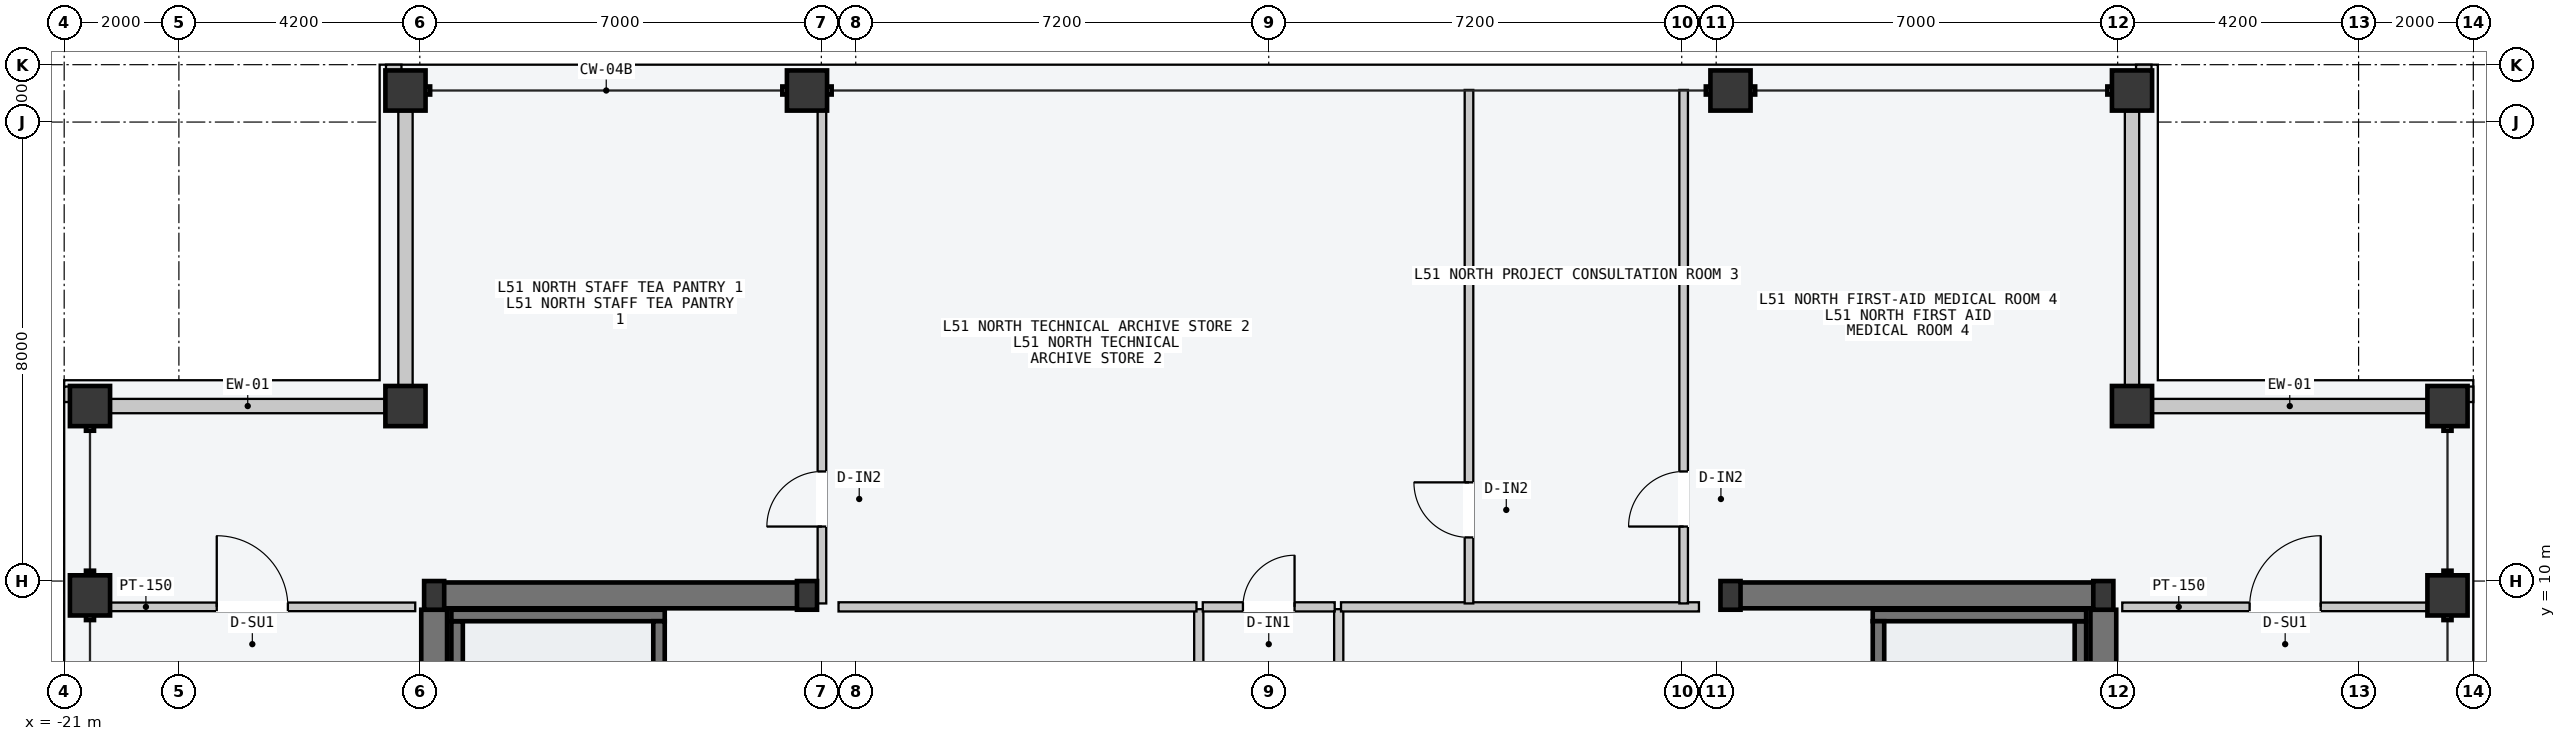
"""IFC4 building model, lengths in metres.
Left out: names, types, materials, properties, quantities, classifications, styles, units other than length and angle.
Written with IfcOpenShell. Run it as: python <this file> out.ifc"""

import sys

from ifc_helpers import new_model, si_unit, direction, frame, frame_2d, origin, origin_2d, place, context, subcontext, project, spatial, rectangle, hollow_rectangle, i_section, extrude, element, fill, save


model = new_model("IFC4")
c1 = context("Model", 3, precision=1e-05, world=origin(), true_north=direction((0.0, 1.0)))
c2 = subcontext(c1, "Body", "Model", "MODEL_VIEW")
j1 = project(units=[si_unit("LENGTHUNIT", "METRE"), si_unit("PLANEANGLEUNIT", "RADIAN")], contexts=[c1])
p1 = place(None, origin())
s1 = spatial("IfcSite", under=j1, at=p1, CompositionType="ELEMENT")
p2 = place(p1, origin())
s2 = spatial("IfcBuilding", under=s1, at=p2, CompositionType="ELEMENT")
p3 = place(p2, frame((0.0, 0.0, 194.7)))
s3 = spatial("IfcBuildingStorey", under=s2, at=p3, CompositionType="ELEMENT", Elevation=194.7)
p4 = place(p3, frame((-14.53, 9.75, -0.2), z_axis=(0.0, 0.0, 1.0), x_axis=(1.0, 0.0, 0.0)))
e1 = element("IfcWall", 1, at=p4, inside=s3, PredefinedType="SHEAR", context=c2, shape_type="SweptSolid", body=[
    extrude(rectangle(XDim=6.46, YDim=0.45, at=frame_2d((3.23, 0.0))), origin(), (0.0, 0.0, 1.0), 3.6),
])
p5 = place(p3, frame((-14.55, 0.25, -0.2), z_axis=(0.0, 0.0, 1.0), x_axis=(0.0, 1.0, 0.0)))
e2 = element("IfcWall", 2, at=p5, inside=s3, PredefinedType="SHEAR", context=c2, shape_type="SweptSolid", body=[
    extrude(rectangle(XDim=9.25, YDim=0.45, at=frame_2d((4.625, 0.0))), origin(), (0.0, 0.0, 1.0), 3.6),
])
p6 = place(p3, frame((8.07, 9.75, -0.2), z_axis=(0.0, 0.0, 1.0), x_axis=(1.0, 0.0, 0.0)))
e3 = element("IfcWall", 3, at=p6, inside=s3, PredefinedType="SHEAR", context=c2, shape_type="SweptSolid", body=[
    extrude(rectangle(XDim=6.46, YDim=0.45, at=frame_2d((3.23, 0.0))), origin(), (0.0, 0.0, 1.0), 3.6),
])
p7 = place(p3, frame((14.55, 0.25, -0.2), z_axis=(0.0, 0.0, 1.0), x_axis=(0.0, 1.0, 0.0)))
e4 = element("IfcWall", 4, at=p7, inside=s3, PredefinedType="SHEAR", context=c2, shape_type="SweptSolid", body=[
    extrude(rectangle(XDim=9.25, YDim=0.45, at=frame_2d((4.625, 0.0))), origin(), (0.0, 0.0, 1.0), 3.6),
])
for number, where, z_axis, x_axis in (
    (5, (-14.15, 1.5, -0.2), (0.0, 0.0, 1.0), (0.0, 1.0, 0.0)),
    (6, (14.15, 1.5, -0.2), (0.0, 0.0, 1.0), (0.0, 1.0, 0.0)),
):
    element("IfcWall", number, at=place(p3, frame(where, z_axis=z_axis, x_axis=x_axis)), inside=s3, PredefinedType="SOLIDWALL", context=c2, shape_type="SweptSolid", body=[
        extrude(rectangle(XDim=7.8, YDim=0.2, at=frame_2d((3.9, 0.0))), origin(), (0.0, 0.0, 1.0), 3.6),
    ])
p8 = place(p3, frame((-14.25, 9.4, -0.2), z_axis=(0.0, 0.0, 1.0), x_axis=(1.0, 0.0, 0.0)))
e7 = element("IfcWall", 7, at=p8, inside=s3, PredefinedType="SOLIDWALL", context=c2, shape_type="SweptSolid", body=[
    extrude(rectangle(XDim=3.72, YDim=0.2, at=frame_2d((1.86, 0.0))), origin(), (0.0, 0.0, 1.0), 3.6),
])
p9 = place(p3, frame((-10.63, 1.5, -0.2), z_axis=(0.0, 0.0, 1.0), x_axis=(0.0, 1.0, 0.0)))
e8 = element("IfcWall", 8, at=p9, inside=s3, PredefinedType="SOLIDWALL", context=c2, shape_type="SweptSolid", body=[
    extrude(rectangle(XDim=7.8, YDim=0.2, at=frame_2d((3.9, 0.0))), origin(), (0.0, 0.0, 1.0), 3.6),
])
p10 = place(p3, frame((10.53, 9.4, -0.2), z_axis=(0.0, 0.0, 1.0), x_axis=(1.0, 0.0, 0.0)))
e9 = element("IfcWall", 9, at=p10, inside=s3, PredefinedType="SOLIDWALL", context=c2, shape_type="SweptSolid", body=[
    extrude(rectangle(XDim=3.72, YDim=0.2, at=frame_2d((1.86, 0.0))), origin(), (0.0, 0.0, 1.0), 3.6),
])
p11 = place(p3, frame((10.63, 1.5, -0.2), z_axis=(0.0, 0.0, 1.0), x_axis=(0.0, 1.0, 0.0)))
e10 = element("IfcWall", 10, at=p11, inside=s3, PredefinedType="SOLIDWALL", context=c2, shape_type="SweptSolid", body=[
    extrude(rectangle(XDim=7.8, YDim=0.2, at=frame_2d((3.9, 0.0))), origin(), (0.0, 0.0, 1.0), 3.6),
])
for number, where, z_axis, x_axis in (
    (11, (-14.55, 9.75, 0.0), (0.0, 0.0, 1.0), (1.0, 0.0, 0.0)),
    (12, (-8.05, 9.75, 0.0), (0.0, 0.0, 1.0), (1.0, 0.0, 0.0)),
    (13, (8.05, 9.75, 0.0), (0.0, 0.0, 1.0), (1.0, 0.0, 0.0)),
    (14, (14.55, 9.75, 0.0), (0.0, 0.0, 1.0), (1.0, 0.0, 0.0)),
):
    element("IfcColumn", number, at=place(p3, frame(where, z_axis=z_axis, x_axis=x_axis)), inside=s3, PredefinedType="COLUMN", context=c2, shape_type="SweptSolid", body=[
        extrude(i_section(OverallWidth=0.35, OverallDepth=0.5, WebThickness=0.02, FlangeThickness=0.032, at=origin_2d()), origin(), (0.0, 0.0, 1.0), 3.6),
    ])
for number, where, z_axis, x_axis in (
    (15, (-15.05, 18.55, 0.0), (0.0, 0.0, 1.0), (1.0, 0.0, 0.0)),
    (16, (-8.05, 18.55, 0.0), (0.0, 0.0, 1.0), (1.0, 0.0, 0.0)),
    (17, (8.05, 18.55, 0.0), (0.0, 0.0, 1.0), (1.0, 0.0, 0.0)),
    (18, (15.05, 18.55, 0.0), (0.0, 0.0, 1.0), (1.0, 0.0, 0.0)),
    (19, (-20.55, 9.75, 0.0), (0.0, 0.0, 1.0), (0.0, 1.0, 0.0)),
    (20, (-20.55, 13.05, 0.0), (0.0, 0.0, 1.0), (0.0, 1.0, 0.0)),
    (21, (20.55, 9.75, 0.0), (0.0, 0.0, 1.0), (0.0, 1.0, 0.0)),
    (22, (20.55, 13.05, 0.0), (0.0, 0.0, 1.0), (0.0, 1.0, 0.0)),
    (23, (-15.05, 13.05, 0.0), (0.0, 0.0, 1.0), (1.0, 0.0, 0.0)),
    (24, (15.05, 13.05, 0.0), (0.0, 0.0, 1.0), (1.0, 0.0, 0.0)),
):
    element("IfcColumn", number, at=place(p3, frame(where, z_axis=z_axis, x_axis=x_axis)), inside=s3, PredefinedType="COLUMN", context=c2, shape_type="SweptSolid", body=[
        extrude(hollow_rectangle(XDim=0.7, YDim=0.7, WallThickness=0.03, at=origin_2d()), origin(), (0.0, 0.0, 1.0), 3.6),
    ])
for number, where, z_axis, x_axis in (
    (25, (-20.19, 13.05, 0.0), (0.0, 0.0, 1.0), (1.0, 0.0, 0.0)),
    (26, (-15.05, 13.41, 0.0), (0.0, 0.0, 1.0), (0.0, 1.0, 0.0)),
    (27, (15.41, 13.05, 0.0), (0.0, 0.0, 1.0), (1.0, 0.0, 0.0)),
    (28, (15.05, 13.41, 0.0), (0.0, 0.0, 1.0), (0.0, 1.0, 0.0)),
):
    element("IfcWall", number, at=place(p3, frame(where, z_axis=z_axis, x_axis=x_axis)), inside=s3, PredefinedType="STANDARD", context=c2, shape_type="SweptSolid", body=[
        extrude(rectangle(XDim=4.78, YDim=0.25, at=frame_2d((2.39, 0.0))), origin(), (0.0, 0.0, 1.0), 2.75),
    ])
for number, where, z_axis, x_axis in (
    (29, (-15.39, 18.89, 0.0), (0.0, 0.0, 1.0), (1.0, 0.0, 0.0)),
    (30, (-20.89, 13.12, 0.0), (0.0, 0.0, 1.0), (0.0, 1.0, 0.0)),
    (31, (15.12, 18.89, 0.0), (0.0, 0.0, 1.0), (1.0, 0.0, 0.0)),
    (32, (20.89, 13.12, 0.0), (0.0, 0.0, 1.0), (0.0, 1.0, 0.0)),
):
    element("IfcWall", number, at=place(p3, frame(where, z_axis=z_axis, x_axis=x_axis)), inside=s3, PredefinedType="PARAPET", context=c2, shape_type="SweptSolid", body=[
        extrude(rectangle(XDim=0.27, YDim=0.22, at=frame_2d((0.135, 0.0))), origin(), (0.0, 0.0, 1.0), 1.2),
    ])
p12 = place(p3, frame((-1.22, -3.5, 0.0), z_axis=(0.0, 0.0, 1.0), x_axis=(0.0, 1.0, 0.0)))
e33 = element("IfcWall", 33, at=p12, inside=s3, PredefinedType="PARTITIONING", context=c2, shape_type="SweptSolid", body=[
    extrude(rectangle(XDim=13.01, YDim=0.16, at=frame_2d((6.505, 0.0))), origin(), (0.0, 0.0, 1.0), 3.4),
])
p13 = place(p12, frame((6.1, 0.0, 0.0)))
e34 = element("IfcOpeningElement", 34, at=p13, cuts=e33, PredefinedType="OPENING", context=c2, shape_type="SweptSolid", body=[
    extrude(rectangle(XDim=1.24, YDim=2.24, at=frame_2d((0.62, 1.12))), frame((0.0, 0.09, 0.0), z_axis=(0.0, -1.0, 0.0), x_axis=(1.0, 0.0, 0.0)), (0.0, 0.0, 1.0), 0.18),
])
p14 = place(p12, frame((1.6, 0.0, 0.0)))
e35 = element("IfcOpeningElement", 35, at=p14, cuts=e33, PredefinedType="OPENING", context=c2, shape_type="SweptSolid", body=[
    extrude(rectangle(XDim=0.96, YDim=2.18, at=frame_2d((0.48, 1.09))), frame((0.0, 0.09, 0.0), z_axis=(0.0, -1.0, 0.0), x_axis=(1.0, 0.0, 0.0)), (0.0, 0.0, 1.0), 0.18),
])
p15 = place(p3, frame((-7.5, 9.55, 0.0), z_axis=(0.0, 0.0, 1.0), x_axis=(1.0, 0.0, 0.0)))
e36 = element("IfcWall", 36, at=p15, inside=s3, PredefinedType="PARTITIONING", context=c2, shape_type="SweptSolid", body=[
    extrude(rectangle(XDim=6.24, YDim=0.16, at=frame_2d((3.12, 0.0))), origin(), (0.0, 0.0, 1.0), 3.4),
])
p16 = place(p3, frame((1.22, -3.5, 0.0), z_axis=(0.0, 0.0, 1.0), x_axis=(0.0, 1.0, 0.0)))
e37 = element("IfcWall", 37, at=p16, inside=s3, PredefinedType="PARTITIONING", context=c2, shape_type="SweptSolid", body=[
    extrude(rectangle(XDim=13.01, YDim=0.16, at=frame_2d((6.505, 0.0))), origin(), (0.0, 0.0, 1.0), 3.4),
])
p17 = place(p16, frame((6.1, 0.0, 0.0)))
e38 = element("IfcOpeningElement", 38, at=p17, cuts=e37, PredefinedType="OPENING", context=c2, shape_type="SweptSolid", body=[
    extrude(rectangle(XDim=1.24, YDim=2.24, at=frame_2d((0.62, 1.12))), frame((0.0, 0.09, 0.0), z_axis=(0.0, -1.0, 0.0), x_axis=(1.0, 0.0, 0.0)), (0.0, 0.0, 1.0), 0.18),
])
p18 = place(p16, frame((1.6, 0.0, 0.0)))
e39 = element("IfcOpeningElement", 39, at=p18, cuts=e37, PredefinedType="OPENING", context=c2, shape_type="SweptSolid", body=[
    extrude(rectangle(XDim=0.96, YDim=2.18, at=frame_2d((0.48, 1.09))), frame((0.0, 0.09, 0.0), z_axis=(0.0, -1.0, 0.0), x_axis=(1.0, 0.0, 0.0)), (0.0, 0.0, 1.0), 0.18),
])
p19 = place(p3, frame((1.26, 9.55, 0.0), z_axis=(0.0, 0.0, 1.0), x_axis=(1.0, 0.0, 0.0)))
e40 = element("IfcWall", 40, at=p19, inside=s3, PredefinedType="PARTITIONING", context=c2, shape_type="SweptSolid", body=[
    extrude(rectangle(XDim=6.24, YDim=0.16, at=frame_2d((3.12, 0.0))), origin(), (0.0, 0.0, 1.0), 3.4),
])
p20 = place(p3, frame((-7.79, 9.61, 0.0), z_axis=(0.0, 0.0, 1.0), x_axis=(0.0, 1.0, 0.0)))
e41 = element("IfcWall", 41, at=p20, inside=s3, PredefinedType="PARTITIONING", context=c2, shape_type="SweptSolid", body=[
    extrude(rectangle(XDim=8.95, YDim=0.15, at=frame_2d((4.475, 0.0))), origin(), (0.0, 0.0, 1.0), 3.4),
])
p21 = place(p20, frame((1.34, 0.0, 0.0)))
e42 = element("IfcOpeningElement", 42, at=p21, cuts=e41, PredefinedType="OPENING", context=c2, shape_type="SweptSolid", body=[
    extrude(rectangle(XDim=0.96, YDim=2.18, at=frame_2d((0.48, 1.09))), frame((0.0, 0.085, 0.0), z_axis=(0.0, -1.0, 0.0), x_axis=(1.0, 0.0, 0.0)), (0.0, 0.0, 1.0), 0.17),
])
p22 = place(p3, frame((3.491, 9.61, 0.0), z_axis=(0.0, 0.0, 1.0), x_axis=(0.0, 1.0, 0.0)))
e43 = element("IfcWall", 43, at=p22, inside=s3, PredefinedType="PARTITIONING", context=c2, shape_type="SweptSolid", body=[
    extrude(rectangle(XDim=8.95, YDim=0.15, at=frame_2d((4.475, 0.0))), origin(), (0.0, 0.0, 1.0), 3.4),
])
p23 = place(p22, frame((1.15, 0.0, 0.0)))
e44 = element("IfcOpeningElement", 44, at=p23, cuts=e43, PredefinedType="OPENING", context=c2, shape_type="SweptSolid", body=[
    extrude(rectangle(XDim=0.96, YDim=2.18, at=frame_2d((0.48, 1.09))), frame((0.0, 0.085, 0.0), z_axis=(0.0, -1.0, 0.0), x_axis=(1.0, 0.0, 0.0)), (0.0, 0.0, 1.0), 0.17),
])
p24 = place(p3, frame((7.233, 9.61, 0.0), z_axis=(0.0, 0.0, 1.0), x_axis=(0.0, 1.0, 0.0)))
e45 = element("IfcWall", 45, at=p24, inside=s3, PredefinedType="PARTITIONING", context=c2, shape_type="SweptSolid", body=[
    extrude(rectangle(XDim=8.95, YDim=0.15, at=frame_2d((4.475, 0.0))), origin(), (0.0, 0.0, 1.0), 3.4),
])
p25 = place(p24, frame((1.34, 0.0, 0.0)))
e46 = element("IfcOpeningElement", 46, at=p25, cuts=e45, PredefinedType="OPENING", context=c2, shape_type="SweptSolid", body=[
    extrude(rectangle(XDim=0.96, YDim=2.18, at=frame_2d((0.48, 1.09))), frame((0.0, 0.085, 0.0), z_axis=(0.0, -1.0, 0.0), x_axis=(1.0, 0.0, 0.0)), (0.0, 0.0, 1.0), 0.17),
])
p26 = place(p3, frame((-1.15, 9.55, 0.0), z_axis=(0.0, 0.0, 1.0), x_axis=(1.0, 0.0, 0.0)))
e47 = element("IfcWall", 47, at=p26, inside=s3, PredefinedType="PARTITIONING", context=c2, shape_type="SweptSolid", body=[
    extrude(rectangle(XDim=2.3, YDim=0.16, at=frame_2d((1.15, 0.0))), origin(), (0.0, 0.0, 1.0), 3.4),
])
p27 = place(p26, frame((0.7, 0.0, 0.0)))
e48 = element("IfcOpeningElement", 48, at=p27, cuts=e47, PredefinedType="OPENING", context=c2, shape_type="SweptSolid", body=[
    extrude(rectangle(XDim=0.9, YDim=2.15, at=frame_2d((0.45, 1.075))), frame((0.0, 0.09, 0.0), z_axis=(0.0, -1.0, 0.0), x_axis=(1.0, 0.0, 0.0)), (0.0, 0.0, 1.0), 0.18),
])
p28 = place(p3, frame((-20.56, 9.55, 0.0), z_axis=(0.0, 0.0, 1.0), x_axis=(1.0, 0.0, 0.0)))
e49 = element("IfcWall", 49, at=p28, inside=s3, PredefinedType="PARTITIONING", context=c2, shape_type="SweptSolid", body=[
    extrude(rectangle(XDim=5.68, YDim=0.15, at=frame_2d((2.84, 0.0))), origin(), (0.0, 0.0, 1.0), 3.4),
])
p29 = place(p28, frame((2.22, 0.0, 0.0)))
e50 = element("IfcOpeningElement", 50, at=p29, cuts=e49, PredefinedType="OPENING", context=c2, shape_type="SweptSolid", body=[
    extrude(rectangle(XDim=1.24, YDim=2.24, at=frame_2d((0.62, 1.12))), frame((0.0, 0.085, 0.0), z_axis=(0.0, -1.0, 0.0), x_axis=(1.0, 0.0, 0.0)), (0.0, 0.0, 1.0), 0.17),
])
p30 = place(p3, frame((14.88, 9.55, 0.0), z_axis=(0.0, 0.0, 1.0), x_axis=(1.0, 0.0, 0.0)))
e51 = element("IfcWall", 51, at=p30, inside=s3, PredefinedType="PARTITIONING", context=c2, shape_type="SweptSolid", body=[
    extrude(rectangle(XDim=5.68, YDim=0.15, at=frame_2d((2.84, 0.0))), origin(), (0.0, 0.0, 1.0), 3.4),
])
p31 = place(p30, frame((2.22, 0.0, 0.0)))
e52 = element("IfcOpeningElement", 52, at=p31, cuts=e51, PredefinedType="OPENING", context=c2, shape_type="SweptSolid", body=[
    extrude(rectangle(XDim=1.24, YDim=2.24, at=frame_2d((0.62, 1.12))), frame((0.0, 0.085, 0.0), z_axis=(0.0, -1.0, 0.0), x_axis=(1.0, 0.0, 0.0)), (0.0, 0.0, 1.0), 0.17),
])
p32 = place(p21, origin())
e53 = element("IfcDoor", 53, at=p32, inside=s3, OperationType="SINGLE_SWING_LEFT", PredefinedType="DOOR", context=c2, shape_type="SweptSolid", body=[
    extrude(rectangle(XDim=0.96, YDim=2.18, at=frame_2d((0.48, 1.09))), frame((0.0, 0.025, 0.0), z_axis=(0.0, -1.0, 0.0), x_axis=(1.0, 0.0, 0.0)), (0.0, 0.0, 1.0), 0.05),
])
fill(e42, e53)
p33 = place(p23, origin())
e54 = element("IfcDoor", 54, at=p33, inside=s3, OperationType="SINGLE_SWING_RIGHT", PredefinedType="DOOR", context=c2, shape_type="SweptSolid", body=[
    extrude(rectangle(XDim=0.96, YDim=2.18, at=frame_2d((0.48, 1.09))), frame((0.0, 0.025, 0.0), z_axis=(0.0, -1.0, 0.0), x_axis=(1.0, 0.0, 0.0)), (0.0, 0.0, 1.0), 0.05),
])
fill(e44, e54)
p34 = place(p25, origin())
e55 = element("IfcDoor", 55, at=p34, inside=s3, OperationType="SINGLE_SWING_LEFT", PredefinedType="DOOR", context=c2, shape_type="SweptSolid", body=[
    extrude(rectangle(XDim=0.96, YDim=2.18, at=frame_2d((0.48, 1.09))), frame((0.0, 0.025, 0.0), z_axis=(0.0, -1.0, 0.0), x_axis=(1.0, 0.0, 0.0)), (0.0, 0.0, 1.0), 0.05),
])
fill(e46, e55)
p35 = place(p27, origin())
e56 = element("IfcDoor", 56, at=p35, inside=s3, OperationType="SINGLE_SWING_RIGHT", PredefinedType="DOOR", context=c2, shape_type="SweptSolid", body=[
    extrude(rectangle(XDim=0.9, YDim=2.15, at=frame_2d((0.45, 1.075))), frame((0.0, 0.025, 0.0), z_axis=(0.0, -1.0, 0.0), x_axis=(1.0, 0.0, 0.0)), (0.0, 0.0, 1.0), 0.05),
])
fill(e48, e56)
p36 = place(p29, origin())
e57 = element("IfcDoor", 57, at=p36, inside=s3, OperationType="SINGLE_SWING_LEFT", PredefinedType="DOOR", context=c2, shape_type="SweptSolid", body=[
    extrude(rectangle(XDim=1.24, YDim=2.24, at=frame_2d((0.62, 1.12))), frame((0.0, 0.025, 0.0), z_axis=(0.0, -1.0, 0.0), x_axis=(1.0, 0.0, 0.0)), (0.0, 0.0, 1.0), 0.05),
])
fill(e50, e57)
p37 = place(p31, origin())
e58 = element("IfcDoor", 58, at=p37, inside=s3, OperationType="SINGLE_SWING_RIGHT", PredefinedType="DOOR", context=c2, shape_type="SweptSolid", body=[
    extrude(rectangle(XDim=1.24, YDim=2.24, at=frame_2d((0.62, 1.12))), frame((0.0, 0.025, 0.0), z_axis=(0.0, -1.0, 0.0), x_axis=(1.0, 0.0, 0.0)), (0.0, 0.0, 1.0), 0.05),
])
fill(e52, e58)
save(model, sys.argv[1])
